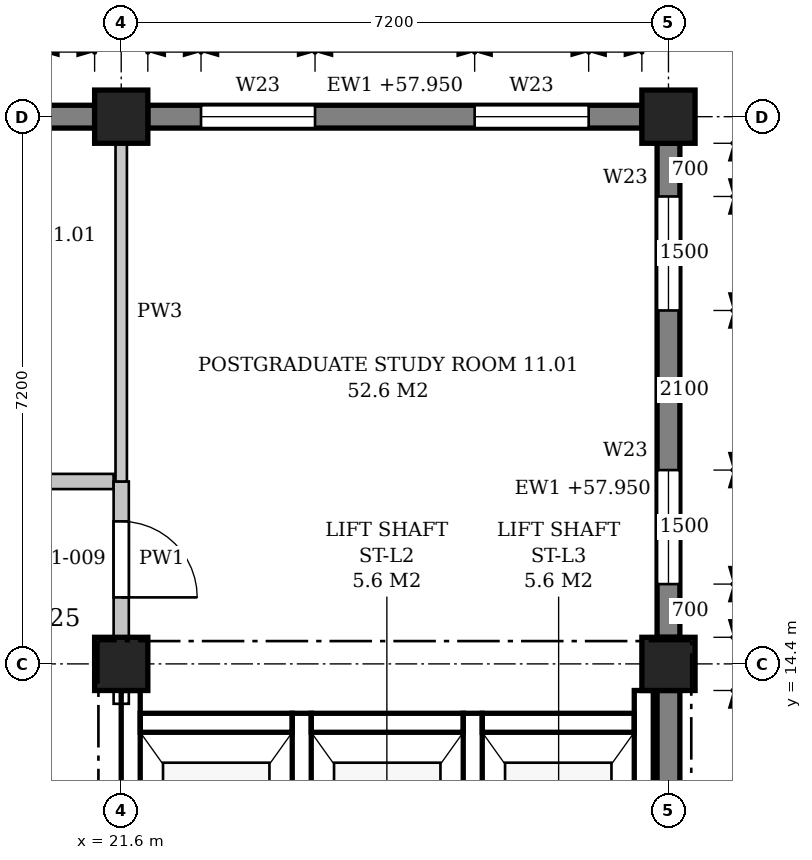
"""IFC4 building model, lengths in metres.
Left out: names, types, materials, properties, quantities, classifications, styles, units other than length and angle.
Written with IfcOpenShell. Run it as: python <this file> out.ifc"""

import sys

from ifc_helpers import new_model, si_unit, direction, frame, frame_2d, origin, origin_2d, place, context, subcontext, project, spatial, polyline, rectangle, outline, extrude, element, fill, save


model = new_model("IFC4")
c1 = context("Model", 3, precision=1e-05, world=origin(), true_north=direction((0.0, 1.0)))
c2 = subcontext(c1, "Body", "Model", "MODEL_VIEW")
j1 = project(units=[si_unit("LENGTHUNIT", "METRE"), si_unit("PLANEANGLEUNIT", "RADIAN")], contexts=[c1])
p1 = place(None, origin())
s1 = spatial("IfcSite", under=j1, at=p1, CompositionType="ELEMENT")
p2 = place(p1, origin())
s2 = spatial("IfcBuilding", under=s1, at=p2, CompositionType="ELEMENT")
p3 = place(p2, frame((0.0, 0.0, 54.3)))
s3 = spatial("IfcBuildingStorey", under=s2, at=p3, CompositionType="ELEMENT", Elevation=54.3)
for number, where, z_axis, x_axis in (
    (1, (21.6, 14.4, 0.0), (0.0, 0.0, 1.0), (1.0, 0.0, 0.0)),
    (2, (21.6, 21.6, 0.0), (0.0, 0.0, 1.0), (1.0, 0.0, 0.0)),
    (3, (28.8, 14.4, 0.0), (0.0, 0.0, 1.0), (1.0, 0.0, 0.0)),
    (4, (28.8, 21.6, 0.0), (0.0, 0.0, 1.0), (1.0, 0.0, 0.0)),
):
    element("IfcColumn", number, at=place(p3, frame(where, z_axis=z_axis, x_axis=x_axis)), inside=s3, PredefinedType="COLUMN", context=c2, shape_type="SweptSolid", body=[
        extrude(rectangle(XDim=0.7, YDim=0.7, at=origin_2d()), origin(), (0.0, 0.0, 1.0), 4.5),
    ])
p4 = place(p3, frame((28.8, 7.55, 0.0), z_axis=(0.0, 0.0, 1.0), x_axis=(0.0, 1.0, 0.0)))
e5 = element("IfcWall", 5, at=p4, inside=s3, PredefinedType="STANDARD", context=c2, shape_type="SweptSolid", body=[
    extrude(rectangle(XDim=6.5, YDim=0.3, at=frame_2d((3.25, 0.0))), origin(), (0.0, 0.0, 1.0), 3.65),
])
p5 = place(p4, frame((0.7, 0.0, 0.9)))
e6 = element("IfcOpeningElement", 6, at=p5, cuts=e5, PredefinedType="OPENING", context=c2, shape_type="SweptSolid", body=[
    extrude(outline(polyline([(0.0, 0.0), (1.5, 0.0), (1.5, 1.95), (0.75, 2.7), (0.0, 1.95), (0.0, 0.0)])), frame((0.0, 0.16, 0.0), z_axis=(0.0, -1.0, 0.0), x_axis=(1.0, 0.0, 0.0)), (0.0, 0.0, 1.0), 0.32),
])
p6 = place(p3, frame((28.8, 14.75, 0.0), z_axis=(0.0, 0.0, 1.0), x_axis=(0.0, 1.0, 0.0)))
e7 = element("IfcWall", 7, at=p6, inside=s3, PredefinedType="STANDARD", context=c2, shape_type="SweptSolid", body=[
    extrude(rectangle(XDim=6.5, YDim=0.3, at=frame_2d((3.25, 0.0))), origin(), (0.0, 0.0, 1.0), 3.65),
])
p7 = place(p6, frame((0.7, 0.0, 0.9)))
e8 = element("IfcOpeningElement", 8, at=p7, cuts=e7, PredefinedType="OPENING", context=c2, shape_type="SweptSolid", body=[
    extrude(outline(polyline([(0.0, 0.0), (1.5, 0.0), (1.5, 1.95), (0.75, 2.7), (0.0, 1.95), (0.0, 0.0)])), frame((0.0, 0.16, 0.0), z_axis=(0.0, -1.0, 0.0), x_axis=(1.0, 0.0, 0.0)), (0.0, 0.0, 1.0), 0.32),
])
p8 = place(p6, frame((4.3, 0.0, 0.9)))
e9 = element("IfcOpeningElement", 9, at=p8, cuts=e7, PredefinedType="OPENING", context=c2, shape_type="SweptSolid", body=[
    extrude(outline(polyline([(0.0, 0.0), (1.5, 0.0), (1.5, 1.95), (0.75, 2.7), (0.0, 1.95), (0.0, 0.0)])), frame((0.0, 0.16, 0.0), z_axis=(0.0, -1.0, 0.0), x_axis=(1.0, 0.0, 0.0)), (0.0, 0.0, 1.0), 0.32),
])
p9 = place(p3, frame((28.45, 21.6, 0.0), z_axis=(0.0, 0.0, 1.0), x_axis=(-1.0, 0.0, 0.0)))
e10 = element("IfcWall", 10, at=p9, inside=s3, PredefinedType="STANDARD", context=c2, shape_type="SweptSolid", body=[
    extrude(rectangle(XDim=6.5, YDim=0.3, at=frame_2d((3.25, 0.0))), origin(), (0.0, 0.0, 1.0), 3.65),
])
p10 = place(p9, frame((0.7, 0.0, 0.9)))
e11 = element("IfcOpeningElement", 11, at=p10, cuts=e10, PredefinedType="OPENING", context=c2, shape_type="SweptSolid", body=[
    extrude(outline(polyline([(0.0, 0.0), (1.5, 0.0), (1.5, 1.95), (0.75, 2.7), (0.0, 1.95), (0.0, 0.0)])), frame((0.0, 0.16, 0.0), z_axis=(0.0, -1.0, 0.0), x_axis=(1.0, 0.0, 0.0)), (0.0, 0.0, 1.0), 0.32),
])
p11 = place(p9, frame((4.3, 0.0, 0.9)))
e12 = element("IfcOpeningElement", 12, at=p11, cuts=e10, PredefinedType="OPENING", context=c2, shape_type="SweptSolid", body=[
    extrude(outline(polyline([(0.0, 0.0), (1.5, 0.0), (1.5, 1.95), (0.75, 2.7), (0.0, 1.95), (0.0, 0.0)])), frame((0.0, 0.16, 0.0), z_axis=(0.0, -1.0, 0.0), x_axis=(1.0, 0.0, 0.0)), (0.0, 0.0, 1.0), 0.32),
])
p12 = place(p3, frame((21.25, 21.6, 0.0), z_axis=(0.0, 0.0, 1.0), x_axis=(-1.0, 0.0, 0.0)))
e13 = element("IfcWall", 13, at=p12, inside=s3, PredefinedType="STANDARD", context=c2, shape_type="SweptSolid", body=[
    extrude(rectangle(XDim=6.5, YDim=0.3, at=frame_2d((3.25, 0.0))), origin(), (0.0, 0.0, 1.0), 3.65),
])
p13 = place(p12, frame((0.7, 0.0, 0.9)))
e14 = element("IfcOpeningElement", 14, at=p13, cuts=e13, PredefinedType="OPENING", context=c2, shape_type="SweptSolid", body=[
    extrude(outline(polyline([(0.0, 0.0), (1.5, 0.0), (1.5, 1.95), (0.75, 2.7), (0.0, 1.95), (0.0, 0.0)])), frame((0.0, 0.16, 0.0), z_axis=(0.0, -1.0, 0.0), x_axis=(1.0, 0.0, 0.0)), (0.0, 0.0, 1.0), 0.32),
])
p14 = place(p12, frame((4.3, 0.0, 0.9)))
e15 = element("IfcOpeningElement", 15, at=p14, cuts=e13, PredefinedType="OPENING", context=c2, shape_type="SweptSolid", body=[
    extrude(outline(polyline([(0.0, 0.0), (1.5, 0.0), (1.5, 1.95), (0.75, 2.7), (0.0, 1.95), (0.0, 0.0)])), frame((0.0, 0.16, 0.0), z_axis=(0.0, -1.0, 0.0), x_axis=(1.0, 0.0, 0.0)), (0.0, 0.0, 1.0), 0.32),
])
p15 = place(p3, frame((21.725, 10.45, -0.25), z_axis=(0.0, 0.0, 1.0), x_axis=(0.0, 1.0, 0.0)))
e16 = element("IfcWall", 16, at=p15, inside=s3, PredefinedType="SHEAR", context=c2, shape_type="SweptSolid", body=[
    extrude(rectangle(XDim=3.6, YDim=0.25, at=frame_2d((1.8, 0.0))), origin(), (0.0, 0.0, 1.0), 3.8),
])
for number, where, z_axis, x_axis in (
    (17, (23.975, 10.45, -0.25), (0.0, 0.0, 1.0), (0.0, 1.0, 0.0)),
    (18, (26.225, 10.45, -0.25), (0.0, 0.0, 1.0), (0.0, 1.0, 0.0)),
):
    element("IfcWall", number, at=place(p3, frame(where, z_axis=z_axis, x_axis=x_axis)), inside=s3, PredefinedType="SHEAR", context=c2, shape_type="SweptSolid", body=[
        extrude(rectangle(XDim=3.3, YDim=0.25, at=frame_2d((1.65, 0.0))), origin(), (0.0, 0.0, 1.0), 4.5),
    ])
p16 = place(p3, frame((28.475, 10.45, -0.25), z_axis=(0.0, 0.0, 1.0), x_axis=(0.0, 1.0, 0.0)))
e19 = element("IfcWall", 19, at=p16, inside=s3, PredefinedType="SHEAR", context=c2, shape_type="SweptSolid", body=[
    extrude(rectangle(XDim=3.6, YDim=0.25, at=frame_2d((1.8, 0.0))), origin(), (0.0, 0.0, 1.0), 4.5),
])
for number, where, z_axis, x_axis in (
    (20, (21.85, 13.625, -0.25), (0.0, 0.0, 1.0), (1.0, 0.0, 0.0)),
    (21, (24.1, 13.625, -0.25), (0.0, 0.0, 1.0), (1.0, 0.0, 0.0)),
    (22, (26.35, 13.625, -0.25), (0.0, 0.0, 1.0), (1.0, 0.0, 0.0)),
):
    element("IfcWall", number, at=place(p3, frame(where, z_axis=z_axis, x_axis=x_axis)), inside=s3, PredefinedType="SHEAR", context=c2, shape_type="SweptSolid", body=[
        extrude(rectangle(XDim=2.0, YDim=0.25, at=frame_2d((1.0, 0.0))), origin(), (0.0, 0.0, 1.0), 4.5),
    ])
p17 = place(p3, frame((18.1, 16.8, 0.0), z_axis=(0.0, 0.0, 1.0), x_axis=(1.0, 0.0, 0.0)))
e23 = element("IfcWall", 23, at=p17, inside=s3, PredefinedType="PARTITIONING", context=c2, shape_type="SweptSolid", body=[
    extrude(outline(polyline([(0.0, 0.0), (3.4, 0.0), (3.4, 3.55), (3.275, 3.55), (3.275, 4.25), (0.0, 4.25), (0.0, 0.0)])), frame((0.0, 0.1, 0.0), z_axis=(0.0, -1.0, 0.0), x_axis=(1.0, 0.0, 0.0)), (0.0, 0.0, 1.0), 0.2),
])
p18 = place(p17, frame((1.2, 0.0, 0.0)))
e24 = element("IfcOpeningElement", 24, at=p18, cuts=e23, PredefinedType="OPENING", context=c2, shape_type="SweptSolid", body=[
    extrude(rectangle(XDim=1.0, YDim=2.1, at=frame_2d((0.5, 1.05))), frame((0.0, 0.11, 0.0), z_axis=(0.0, -1.0, 0.0), x_axis=(1.0, 0.0, 0.0)), (0.0, 0.0, 1.0), 0.22),
])
p19 = place(p3, frame((21.6, 13.875, 0.0), z_axis=(0.0, 0.0, 1.0), x_axis=(0.0, 1.0, 0.0)))
e25 = element("IfcWall", 25, at=p19, inside=s3, PredefinedType="PARTITIONING", context=c2, shape_type="SweptSolid", body=[
    extrude(rectangle(XDim=0.175, YDim=0.2, at=frame_2d((0.087, 0.0))), origin(), (0.0, 0.0, 1.0), 3.55),
])
p20 = place(p3, frame((21.6, 14.75, 0.0), z_axis=(0.0, 0.0, 1.0), x_axis=(0.0, 1.0, 0.0)))
e26 = element("IfcWall", 26, at=p20, inside=s3, PredefinedType="PARTITIONING", context=c2, shape_type="SweptSolid", body=[
    extrude(rectangle(XDim=2.05, YDim=0.2, at=frame_2d((1.025, 0.0))), origin(), (0.0, 0.0, 1.0), 3.55),
])
p21 = place(p20, frame((0.525, 0.0, 0.0)))
e27 = element("IfcOpeningElement", 27, at=p21, cuts=e26, PredefinedType="OPENING", context=c2, shape_type="SweptSolid", body=[
    extrude(rectangle(XDim=1.0, YDim=2.1, at=frame_2d((0.5, 1.05))), frame((0.0, 0.11, 0.0), z_axis=(0.0, -1.0, 0.0), x_axis=(1.0, 0.0, 0.0)), (0.0, 0.0, 1.0), 0.22),
])
p22 = place(p3, frame((21.6, 16.8, 0.0), z_axis=(0.0, 0.0, 1.0), x_axis=(0.0, 1.0, 0.0)))
e28 = element("IfcWall", 28, at=p22, inside=s3, PredefinedType="PARTITIONING", context=c2, shape_type="SweptSolid", body=[
    extrude(rectangle(XDim=4.45, YDim=0.15, at=frame_2d((2.225, 0.0))), origin(), (0.0, 0.0, 1.0), 3.55),
])
p23 = place(p7, origin())
e29 = element("IfcWindow", 29, at=p23, inside=s3, PartitioningType="SINGLE_PANEL", PredefinedType="WINDOW", context=c2, shape_type="SweptSolid", body=[
    extrude(outline(polyline([(0.0, 0.0), (1.5, 0.0), (1.5, 1.95), (0.75, 2.7), (0.0, 1.95), (0.0, 0.0)])), frame((0.0, 0.03, 0.0), z_axis=(0.0, -1.0, 0.0), x_axis=(1.0, 0.0, 0.0)), (0.0, 0.0, 1.0), 0.06),
])
fill(e8, e29)
p24 = place(p8, origin())
e30 = element("IfcWindow", 30, at=p24, inside=s3, PartitioningType="SINGLE_PANEL", PredefinedType="WINDOW", context=c2, shape_type="SweptSolid", body=[
    extrude(outline(polyline([(0.0, 0.0), (1.5, 0.0), (1.5, 1.95), (0.75, 2.7), (0.0, 1.95), (0.0, 0.0)])), frame((0.0, 0.03, 0.0), z_axis=(0.0, -1.0, 0.0), x_axis=(1.0, 0.0, 0.0)), (0.0, 0.0, 1.0), 0.06),
])
fill(e9, e30)
p25 = place(p10, origin())
e31 = element("IfcWindow", 31, at=p25, inside=s3, PartitioningType="SINGLE_PANEL", PredefinedType="WINDOW", context=c2, shape_type="SweptSolid", body=[
    extrude(outline(polyline([(0.0, 0.0), (1.5, 0.0), (1.5, 1.95), (0.75, 2.7), (0.0, 1.95), (0.0, 0.0)])), frame((0.0, 0.03, 0.0), z_axis=(0.0, -1.0, 0.0), x_axis=(1.0, 0.0, 0.0)), (0.0, 0.0, 1.0), 0.06),
])
fill(e11, e31)
p26 = place(p11, origin())
e32 = element("IfcWindow", 32, at=p26, inside=s3, PartitioningType="SINGLE_PANEL", PredefinedType="WINDOW", context=c2, shape_type="SweptSolid", body=[
    extrude(outline(polyline([(0.0, 0.0), (1.5, 0.0), (1.5, 1.95), (0.75, 2.7), (0.0, 1.95), (0.0, 0.0)])), frame((0.0, 0.03, 0.0), z_axis=(0.0, -1.0, 0.0), x_axis=(1.0, 0.0, 0.0)), (0.0, 0.0, 1.0), 0.06),
])
fill(e12, e32)
p27 = place(p21, frame((1.0, 0.0, 0.0), z_axis=(0.0, 0.0, 1.0), x_axis=(-1.0, 0.0, 0.0)))
e33 = element("IfcDoor", 33, at=p27, inside=s3, OperationType="SINGLE_SWING_RIGHT", PredefinedType="DOOR", context=c2, shape_type="SweptSolid", body=[
    extrude(rectangle(XDim=1.0, YDim=2.1, at=frame_2d((0.5, 1.05))), frame((0.0, 0.025, 0.0), z_axis=(0.0, -1.0, 0.0), x_axis=(1.0, 0.0, 0.0)), (0.0, 0.0, 1.0), 0.05),
])
fill(e27, e33)
save(model, sys.argv[1])
